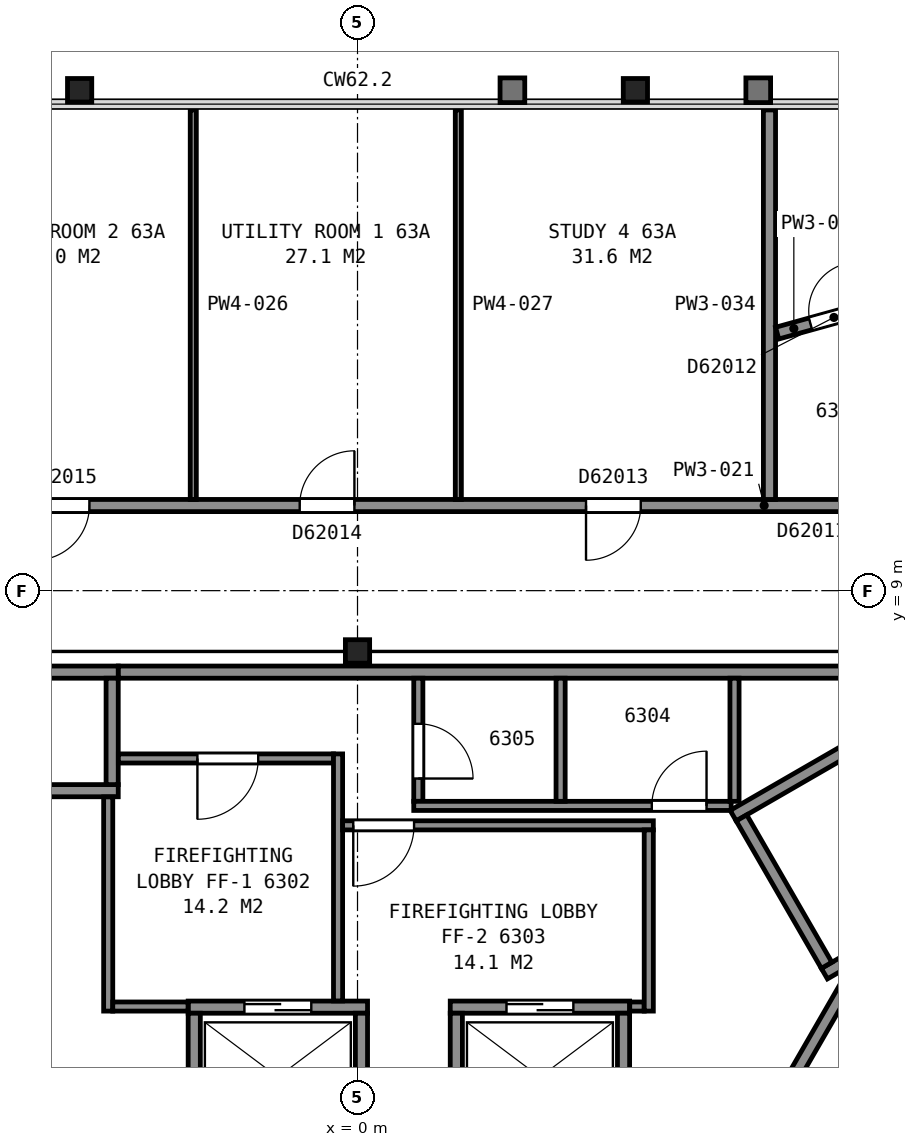
"""IFC4 building model, lengths in metres.
Left out: names, types, materials, properties, quantities, classifications, styles, units other than length and angle.
Written with IfcOpenShell. Run it as: python <this file> out.ifc"""

import sys

from ifc_helpers import new_model, si_unit, direction, frame, frame_2d, origin, origin_2d, place, context, subcontext, project, spatial, rectangle, i_section, extrude, element, fill, save


model = new_model("IFC4")
c1 = context("Model", 3, precision=1e-05, world=origin(), true_north=direction((0.0, 1.0)))
c2 = subcontext(c1, "Body", "Model", "MODEL_VIEW")
j1 = project(units=[si_unit("LENGTHUNIT", "METRE"), si_unit("PLANEANGLEUNIT", "RADIAN")], contexts=[c1])
p1 = place(None, origin())
s1 = spatial("IfcSite", under=j1, at=p1, CompositionType="ELEMENT")
p2 = place(p1, origin())
s2 = spatial("IfcBuilding", under=s1, at=p2, CompositionType="ELEMENT")
p3 = place(p2, frame((0.0, 0.0, 250.8)))
s3 = spatial("IfcBuildingStorey", under=s2, at=p3, CompositionType="ELEMENT", Elevation=250.8)
for number, where, z_axis, x_axis in (
    (1, (4.57, 17.23, 0.0), (0.0, 0.0, 1.0), (1.0, 0.0, 0.0)),
    (2, (-4.57, 17.23, 0.0), (0.0, 0.0, 1.0), (1.0, 0.0, 0.0)),
    (3, (0.0, 8.0, 0.0), (0.0, 0.0, 1.0), (1.0, 0.0, 0.0)),
):
    element("IfcColumn", number, at=place(p3, frame(where, z_axis=z_axis, x_axis=x_axis)), inside=s3, PredefinedType="COLUMN", context=c2, shape_type="SweptSolid", body=[
        extrude(i_section(OverallWidth=0.399, OverallDepth=0.386, WebThickness=0.021, FlangeThickness=0.033, FilletRadius=0.015, at=origin_2d()), origin(), (0.0, 0.0, 1.0), 3.7),
    ])
for number, where, z_axis, x_axis in (
    (4, (6.178, 5.299, 0.0), (0.0, 0.0, 1.0), (0.866, 0.5, 0.0)),
    (5, (7.678, 2.701, 0.0), (0.0, 0.0, 1.0), (0.866, 0.5, 0.0)),
):
    element("IfcWall", number, at=place(p3, frame(where, z_axis=z_axis, x_axis=x_axis)), inside=s3, PredefinedType="PARTITIONING", context=c2, shape_type="SweptSolid", body=[
        extrude(rectangle(XDim=9.6, YDim=0.2, at=frame_2d((4.8, 0.0))), origin(), (0.0, 0.0, 1.0), 3.45),
    ])
p4 = place(p3, frame((7.715, 2.838, 0.0), z_axis=(0.0, 0.0, 1.0), x_axis=(-0.500049511043, 0.865996816683, 0.0)))
e6 = element("IfcWall", 6, at=p4, inside=s3, PredefinedType="PARTITIONING", context=c2, shape_type="SweptSolid", body=[
    extrude(rectangle(XDim=2.8, YDim=0.2, at=frame_2d((1.4, 0.0))), origin(), (0.0, 0.0, 1.0), 3.45),
])
p5 = place(p3, frame((-2.785, 2.15, 0.0), z_axis=(0.0, 0.0, 1.0), x_axis=(1.0, 0.0, 0.0)))
e7 = element("IfcWall", 7, at=p5, inside=s3, PredefinedType="PARTITIONING", context=c2, shape_type="SweptSolid", body=[
    extrude(rectangle(XDim=2.95, YDim=0.2, at=frame_2d((1.475, 0.0))), origin(), (0.0, 0.0, 1.0), 3.7),
])
p6 = place(p5, frame((0.925, 0.0, 0.0)))
e8 = element("IfcOpeningElement", 8, at=p6, cuts=e7, PredefinedType="OPENING", context=c2, shape_type="SweptSolid", body=[
    extrude(rectangle(XDim=1.1, YDim=2.1, at=frame_2d((0.55, 1.05))), frame((0.0, 0.11, 0.0), z_axis=(0.0, -1.0, 0.0), x_axis=(1.0, 0.0, 0.0)), (0.0, 0.0, 1.0), 0.22),
])
p7 = place(p3, frame((1.525, 2.15, 0.0), z_axis=(0.0, 0.0, 1.0), x_axis=(1.0, 0.0, 0.0)))
e9 = element("IfcWall", 9, at=p7, inside=s3, PredefinedType="PARTITIONING", context=c2, shape_type="SweptSolid", body=[
    extrude(rectangle(XDim=2.95, YDim=0.2, at=frame_2d((1.475, 0.0))), origin(), (0.0, 0.0, 1.0), 3.7),
])
p8 = place(p7, frame((0.925, 0.0, 0.0)))
e10 = element("IfcOpeningElement", 10, at=p8, cuts=e9, PredefinedType="OPENING", context=c2, shape_type="SweptSolid", body=[
    extrude(rectangle(XDim=1.1, YDim=2.1, at=frame_2d((0.55, 1.05))), frame((0.0, 0.11, 0.0), z_axis=(0.0, -1.0, 0.0), x_axis=(1.0, 0.0, 0.0)), (0.0, 0.0, 1.0), 0.22),
])
for number, where, z_axis, x_axis in (
    (11, (-6.285, 5.71, 0.0), (0.0, 0.0, 1.0), (1.0, 0.0, 0.0)),
    (12, (-6.285, 7.66, 0.0), (0.0, 0.0, 1.0), (1.0, 0.0, 0.0)),
):
    element("IfcWall", number, at=place(p3, frame(where, z_axis=z_axis, x_axis=x_axis)), inside=s3, PredefinedType="PARTITIONING", context=c2, shape_type="SweptSolid", body=[
        extrude(rectangle(XDim=2.35, YDim=0.2, at=frame_2d((1.175, 0.0))), origin(), (0.0, 0.0, 1.0), 3.7),
    ])
p9 = place(p3, frame((7.351, -2.587, 0.0), z_axis=(0.0, 0.0, 1.0), x_axis=(0.500002801628, 0.866023786258, 0.0)))
e13 = element("IfcWall", 13, at=p9, inside=s3, PredefinedType="PARTITIONING", context=c2, shape_type="SweptSolid", body=[
    extrude(rectangle(XDim=4.9, YDim=0.2, at=frame_2d((2.45, 0.0))), origin(), (0.0, 0.0, 1.0), 3.7),
])
p10 = place(p3, frame((5.663, -1.612, 0.0), z_axis=(0.0, 0.0, 1.0), x_axis=(0.49998122708, 0.866036242063, 0.0)))
e14 = element("IfcWall", 14, at=p10, inside=s3, PredefinedType="PARTITIONING", context=c2, shape_type="SweptSolid", body=[
    extrude(rectangle(XDim=4.9, YDim=0.2, at=frame_2d((2.45, 0.0))), origin(), (0.0, 0.0, 1.0), 3.7),
])
for number, where, z_axis, x_axis in (
    (15, (4.375, 0.1, 0.0), (0.0, 0.0, 1.0), (0.0, 1.0, 0.0)),
    (16, (1.625, 0.1, 0.0), (0.0, 0.0, 1.0), (0.0, 1.0, 0.0)),
    (17, (0.065, 0.1, 0.0), (0.0, 0.0, 1.0), (0.0, 1.0, 0.0)),
    (18, (-2.685, 0.1, 0.0), (0.0, 0.0, 1.0), (0.0, 1.0, 0.0)),
):
    element("IfcWall", number, at=place(p3, frame(where, z_axis=z_axis, x_axis=x_axis)), inside=s3, PredefinedType="PARTITIONING", context=c2, shape_type="SweptSolid", body=[
        extrude(rectangle(XDim=1.95, YDim=0.2, at=frame_2d((0.975, 0.0))), origin(), (0.0, 0.0, 1.0), 3.7),
    ])
p11 = place(p3, frame((-4.035, 5.81, 0.0), z_axis=(0.0, 0.0, 1.0), x_axis=(0.0, 1.0, 0.0)))
e19 = element("IfcWall", 19, at=p11, inside=s3, PredefinedType="PARTITIONING", context=c2, shape_type="SweptSolid", body=[
    extrude(rectangle(XDim=1.75, YDim=0.2, at=frame_2d((0.875, 0.0))), origin(), (0.0, 0.0, 1.0), 3.7),
])
p12 = place(p3, frame((-4.1, 2.085, 0.0), z_axis=(0.0, 0.0, 1.0), x_axis=(0.0, 1.0, 0.0)))
e20 = element("IfcWall", 20, at=p12, inside=s3, PredefinedType="PARTITIONING", context=c2, shape_type="SweptSolid", body=[
    extrude(rectangle(XDim=3.523, YDim=0.15, at=frame_2d((1.761, 0.0))), origin(), (0.0, 0.0, 1.0), 3.45),
])
p13 = place(p3, frame((-4.025, 2.16, 0.0), z_axis=(0.0, 0.0, 1.0), x_axis=(1.0, 0.0, 0.0)))
e21 = element("IfcWall", 21, at=p13, inside=s3, PredefinedType="PARTITIONING", context=c2, shape_type="SweptSolid", body=[
    extrude(rectangle(XDim=1.238, YDim=0.15, at=frame_2d((0.619, 0.0))), origin(), (0.0, 0.0, 1.0), 3.45),
])
p14 = place(p3, frame((-3.933, 6.24, 0.0), z_axis=(0.0, 0.0, 1.0), x_axis=(1.0, 0.0, 0.0)))
e22 = element("IfcWall", 22, at=p14, inside=s3, PredefinedType="PARTITIONING", context=c2, shape_type="SweptSolid", body=[
    extrude(rectangle(XDim=3.538, YDim=0.15, at=frame_2d((1.769, 0.0))), origin(), (0.0, 0.0, 1.0), 3.45),
])
p15 = place(p14, frame((1.3, 0.0, 0.0)))
e23 = element("IfcOpeningElement", 23, at=p15, cuts=e22, PredefinedType="OPENING", context=c2, shape_type="SweptSolid", body=[
    extrude(rectangle(XDim=1.0, YDim=2.1, at=frame_2d((0.5, 1.05))), frame((0.0, 0.085, 0.0), z_axis=(0.0, -1.0, 0.0), x_axis=(1.0, 0.0, 0.0)), (0.0, 0.0, 1.0), 0.17),
])
p16 = place(p3, frame((-3.933, 7.66, 0.0), z_axis=(0.0, 0.0, 1.0), x_axis=(1.0, 0.0, 0.0)))
e24 = element("IfcWall", 24, at=p16, inside=s3, PredefinedType="PARTITIONING", context=c2, shape_type="SweptSolid", body=[
    extrude(rectangle(XDim=13.841, YDim=0.2, at=frame_2d((6.92, 0.0))), origin(), (0.0, 0.0, 1.0), 3.45),
])
p17 = place(p3, frame((-0.32, 2.252, 0.0), z_axis=(0.0, 0.0, 1.0), x_axis=(0.0, 1.0, 0.0)))
e25 = element("IfcWall", 25, at=p17, inside=s3, PredefinedType="PARTITIONING", context=c2, shape_type="SweptSolid", body=[
    extrude(rectangle(XDim=4.063, YDim=0.15, at=frame_2d((2.031, 0.0))), origin(), (0.0, 0.0, 1.0), 3.45),
])
p18 = place(p3, frame((-0.245, 5.14, 0.0), z_axis=(0.0, 0.0, 1.0), x_axis=(1.0, 0.0, 0.0)))
e26 = element("IfcWall", 26, at=p18, inside=s3, PredefinedType="PARTITIONING", context=c2, shape_type="SweptSolid", body=[
    extrude(rectangle(XDim=5.11, YDim=0.15, at=frame_2d((2.555, 0.0))), origin(), (0.0, 0.0, 1.0), 3.45),
])
p19 = place(p18, frame((0.175, 0.0, 0.0)))
e27 = element("IfcOpeningElement", 27, at=p19, cuts=e26, PredefinedType="OPENING", context=c2, shape_type="SweptSolid", body=[
    extrude(rectangle(XDim=1.0, YDim=2.1, at=frame_2d((0.5, 1.05))), frame((0.0, 0.085, 0.0), z_axis=(0.0, -1.0, 0.0), x_axis=(1.0, 0.0, 0.0)), (0.0, 0.0, 1.0), 0.17),
])
p20 = place(p3, frame((1.0, 7.56, 0.0), z_axis=(0.0, 0.0, 1.0), x_axis=(0.0, -1.0, 0.0)))
e28 = element("IfcWall", 28, at=p20, inside=s3, PredefinedType="PARTITIONING", context=c2, shape_type="SweptSolid", body=[
    extrude(rectangle(XDim=2.025, YDim=0.15, at=frame_2d((1.013, 0.0))), origin(), (0.0, 0.0, 1.0), 3.45),
])
p21 = place(p20, frame((0.75, 0.0, 0.0)))
e29 = element("IfcOpeningElement", 29, at=p21, cuts=e28, PredefinedType="OPENING", context=c2, shape_type="SweptSolid", body=[
    extrude(rectangle(XDim=0.9, YDim=2.1, at=frame_2d((0.45, 1.05))), frame((0.0, 0.085, 0.0), z_axis=(0.0, -1.0, 0.0), x_axis=(1.0, 0.0, 0.0)), (0.0, 0.0, 1.0), 0.17),
])
p22 = place(p3, frame((0.925, 5.46, 0.0), z_axis=(0.0, 0.0, 1.0), x_axis=(1.0, 0.0, 0.0)))
e30 = element("IfcWall", 30, at=p22, inside=s3, PredefinedType="PARTITIONING", context=c2, shape_type="SweptSolid", body=[
    extrude(rectangle(XDim=5.22, YDim=0.15, at=frame_2d((2.61, 0.0))), origin(), (0.0, 0.0, 1.0), 3.45),
])
p23 = place(p22, frame((3.915, 0.0, 0.0)))
e31 = element("IfcOpeningElement", 31, at=p23, cuts=e30, PredefinedType="OPENING", context=c2, shape_type="SweptSolid", body=[
    extrude(rectangle(XDim=0.9, YDim=2.1, at=frame_2d((0.45, 1.05))), frame((0.0, 0.085, 0.0), z_axis=(0.0, -1.0, 0.0), x_axis=(1.0, 0.0, 0.0)), (0.0, 0.0, 1.0), 0.17),
])
p24 = place(p3, frame((3.34, 5.535, 0.0), z_axis=(0.0, 0.0, 1.0), x_axis=(0.0, 1.0, 0.0)))
e32 = element("IfcWall", 32, at=p24, inside=s3, PredefinedType="PARTITIONING", context=c2, shape_type="SweptSolid", body=[
    extrude(rectangle(XDim=2.025, YDim=0.15, at=frame_2d((1.013, 0.0))), origin(), (0.0, 0.0, 1.0), 3.45),
])
p25 = place(p3, frame((4.477, 2.16, 0.0), z_axis=(0.0, 0.0, 1.0), x_axis=(1.0, 0.0, 0.0)))
e33 = element("IfcWall", 33, at=p25, inside=s3, PredefinedType="PARTITIONING", context=c2, shape_type="SweptSolid", body=[
    extrude(rectangle(XDim=0.238, YDim=0.15, at=frame_2d((0.119, 0.0))), origin(), (0.0, 0.0, 1.0), 3.45),
])
p26 = place(p3, frame((4.79, 2.085, 0.0), z_axis=(0.0, 0.0, 1.0), x_axis=(0.0, 1.0, 0.0)))
e34 = element("IfcWall", 34, at=p26, inside=s3, PredefinedType="PARTITIONING", context=c2, shape_type="SweptSolid", body=[
    extrude(rectangle(XDim=2.98, YDim=0.15, at=frame_2d((1.49, 0.0))), origin(), (0.0, 0.0, 1.0), 3.45),
])
p27 = place(p3, frame((6.2, 5.535, 0.0), z_axis=(0.0, 0.0, 1.0), x_axis=(0.0, 1.0, 0.0)))
e35 = element("IfcWall", 35, at=p27, inside=s3, PredefinedType="PARTITIONING", context=c2, shape_type="SweptSolid", body=[
    extrude(rectangle(XDim=2.025, YDim=0.15, at=frame_2d((1.013, 0.0))), origin(), (0.0, 0.0, 1.0), 3.45),
])
p28 = place(p3, frame((-4.675, -12.706, 0.0), z_axis=(0.0, 0.0, 1.0), x_axis=(-0.499972470324, 0.866041297467, 0.0)))
e36 = element("IfcWall", 36, at=p28, inside=s3, PredefinedType="PARTITIONING", context=c2, shape_type="SweptSolid", body=[
    extrude(rectangle(XDim=17.385, YDim=0.2, at=frame_2d((8.692, 0.0))), origin(), (0.0, 0.0, 1.0), 2.713),
])
p29 = place(p28, frame((14.57, 0.0, 0.0)))
e37 = element("IfcOpeningElement", 37, at=p29, cuts=e36, PredefinedType="OPENING", context=c2, shape_type="SweptSolid", body=[
    extrude(rectangle(XDim=0.9, YDim=2.1, at=frame_2d((0.45, 1.05))), frame((0.0, 0.11, 0.0), z_axis=(0.0, -1.0, 0.0), x_axis=(1.0, 0.0, 0.0)), (0.0, 0.0, 1.0), 0.22),
])
p30 = place(p28, frame((11.777, 0.0, 0.0)))
e38 = element("IfcOpeningElement", 38, at=p30, cuts=e36, PredefinedType="OPENING", context=c2, shape_type="SweptSolid", body=[
    extrude(rectangle(XDim=0.9, YDim=2.1, at=frame_2d((0.45, 1.05))), frame((0.0, 0.11, 0.0), z_axis=(0.0, -1.0, 0.0), x_axis=(1.0, 0.0, 0.0)), (0.0, 0.0, 1.0), 0.22),
])
p31 = place(p28, frame((5.095, 0.0, 0.0)))
e39 = element("IfcOpeningElement", 39, at=p31, cuts=e36, PredefinedType="OPENING", context=c2, shape_type="SweptSolid", body=[
    extrude(rectangle(XDim=0.9, YDim=2.1, at=frame_2d((0.45, 1.05))), frame((0.0, 0.11, 0.0), z_axis=(0.0, -1.0, 0.0), x_axis=(1.0, 0.0, 0.0)), (0.0, 0.0, 1.0), 0.22),
])
p32 = place(p3, frame((-8.667, 10.4, 0.0), z_axis=(0.0, 0.0, 1.0), x_axis=(1.0, 0.0, 0.0)))
e40 = element("IfcWall", 40, at=p32, inside=s3, PredefinedType="PARTITIONING", context=c2, shape_type="SweptSolid", body=[
    extrude(rectangle(XDim=17.384, YDim=0.2, at=frame_2d((8.692, 0.0))), origin(), (0.0, 0.0, 1.0), 2.713),
])
p33 = place(p32, frame((12.425, 0.0, 0.0)))
e41 = element("IfcOpeningElement", 41, at=p33, cuts=e40, PredefinedType="OPENING", context=c2, shape_type="SweptSolid", body=[
    extrude(rectangle(XDim=0.9, YDim=2.1, at=frame_2d((0.45, 1.05))), frame((0.0, 0.11, 0.0), z_axis=(0.0, -1.0, 0.0), x_axis=(1.0, 0.0, 0.0)), (0.0, 0.0, 1.0), 0.22),
])
p34 = place(p32, frame((7.716, 0.0, 0.0)))
e42 = element("IfcOpeningElement", 42, at=p34, cuts=e40, PredefinedType="OPENING", context=c2, shape_type="SweptSolid", body=[
    extrude(rectangle(XDim=0.9, YDim=2.1, at=frame_2d((0.45, 1.05))), frame((0.0, 0.11, 0.0), z_axis=(0.0, -1.0, 0.0), x_axis=(1.0, 0.0, 0.0)), (0.0, 0.0, 1.0), 0.22),
])
p35 = place(p32, frame((3.358, 0.0, 0.0)))
e43 = element("IfcOpeningElement", 43, at=p35, cuts=e40, PredefinedType="OPENING", context=c2, shape_type="SweptSolid", body=[
    extrude(rectangle(XDim=0.9, YDim=2.1, at=frame_2d((0.45, 1.05))), frame((0.0, 0.11, 0.0), z_axis=(0.0, -1.0, 0.0), x_axis=(1.0, 0.0, 0.0)), (0.0, 0.0, 1.0), 0.22),
])
for number, where, z_axis, x_axis in (
    (44, (-2.701, 10.5, 0.0), (0.0, 0.0, 1.0), (0.0, 1.0, 0.0)),
    (45, (1.658, 10.5, 0.0), (0.0, 0.0, 1.0), (0.0, 1.0, 0.0)),
):
    element("IfcWall", number, at=place(p3, frame(where, z_axis=z_axis, x_axis=x_axis)), inside=s3, PredefinedType="PARTITIONING", context=c2, shape_type="SweptSolid", body=[
        extrude(rectangle(XDim=6.406, YDim=0.1, at=frame_2d((3.203, 0.0))), origin(), (0.0, 0.0, 1.0), 2.713),
    ])
p36 = place(p3, frame((13.342, 2.306, 0.0), z_axis=(0.0, 0.0, 1.0), x_axis=(-0.499983003136, -0.866035216706, 0.0)))
e46 = element("IfcWall", 46, at=p36, inside=s3, PredefinedType="PARTITIONING", context=c2, shape_type="SweptSolid", body=[
    extrude(rectangle(XDim=17.385, YDim=0.2, at=frame_2d((8.692, 0.0))), origin(), (0.0, 0.0, 1.0), 2.713),
])
p37 = place(p36, frame((15.185, 0.0, 0.0)))
e47 = element("IfcOpeningElement", 47, at=p37, cuts=e46, PredefinedType="OPENING", context=c2, shape_type="SweptSolid", body=[
    extrude(rectangle(XDim=0.9, YDim=2.1, at=frame_2d((0.45, 1.05))), frame((0.0, 0.11, 0.0), z_axis=(0.0, -1.0, 0.0), x_axis=(1.0, 0.0, 0.0)), (0.0, 0.0, 1.0), 0.22),
])
p38 = place(p36, frame((12.094, 0.0, 0.0)))
e48 = element("IfcOpeningElement", 48, at=p38, cuts=e46, PredefinedType="OPENING", context=c2, shape_type="SweptSolid", body=[
    extrude(rectangle(XDim=0.9, YDim=2.1, at=frame_2d((0.45, 1.05))), frame((0.0, 0.11, 0.0), z_axis=(0.0, -1.0, 0.0), x_axis=(1.0, 0.0, 0.0)), (0.0, 0.0, 1.0), 0.22),
])
p39 = place(p36, frame((5.867, 0.0, 0.0)))
e49 = element("IfcOpeningElement", 49, at=p39, cuts=e46, PredefinedType="OPENING", context=c2, shape_type="SweptSolid", body=[
    extrude(rectangle(XDim=0.9, YDim=2.1, at=frame_2d((0.45, 1.05))), frame((0.0, 0.11, 0.0), z_axis=(0.0, -1.0, 0.0), x_axis=(1.0, 0.0, 0.0)), (0.0, 0.0, 1.0), 0.22),
])
p40 = place(p36, frame((1.392, 0.0, 0.0)))
e50 = element("IfcOpeningElement", 50, at=p40, cuts=e46, PredefinedType="OPENING", context=c2, shape_type="SweptSolid", body=[
    extrude(rectangle(XDim=0.9, YDim=2.1, at=frame_2d((0.45, 1.05))), frame((0.0, 0.11, 0.0), z_axis=(0.0, -1.0, 0.0), x_axis=(1.0, 0.0, 0.0)), (0.0, 0.0, 1.0), 0.22),
])
p41 = place(p3, frame((6.775, 10.5, 0.0), z_axis=(0.0, 0.0, 1.0), x_axis=(0.0, 1.0, 0.0)))
e51 = element("IfcWall", 51, at=p41, inside=s3, PredefinedType="PARTITIONING", context=c2, shape_type="SweptSolid", body=[
    extrude(rectangle(XDim=6.406, YDim=0.2, at=frame_2d((3.203, 0.0))), origin(), (0.0, 0.0, 1.0), 2.713),
])
p42 = place(p3, frame((8.75, 13.747, 0.0), z_axis=(0.0, 0.0, 1.0), x_axis=(-0.963674591663, -0.267079166884, 0.0)))
e52 = element("IfcWall", 52, at=p42, inside=s3, PredefinedType="PARTITIONING", context=c2, shape_type="SweptSolid", body=[
    extrude(rectangle(XDim=1.918, YDim=0.2, at=frame_2d((0.959, 0.0))), origin(), (0.0, 0.0, 1.0), 2.713),
])
p43 = place(p42, frame((0.549, 0.0, 0.0)))
e53 = element("IfcOpeningElement", 53, at=p43, cuts=e52, PredefinedType="OPENING", context=c2, shape_type="SweptSolid", body=[
    extrude(rectangle(XDim=0.8, YDim=2.1, at=frame_2d((0.4, 1.05))), frame((0.0, 0.11, 0.0), z_axis=(0.0, -1.0, 0.0), x_axis=(1.0, 0.0, 0.0)), (0.0, 0.0, 1.0), 0.22),
])
p44 = place(p6, origin())
e54 = element("IfcDoor", 54, at=p44, inside=s3, OperationType="SLIDING_TO_LEFT", PredefinedType="DOOR", context=c2, shape_type="SweptSolid", body=[
    extrude(rectangle(XDim=1.1, YDim=2.1, at=frame_2d((0.55, 1.05))), frame((0.0, 0.025, 0.0), z_axis=(0.0, -1.0, 0.0), x_axis=(1.0, 0.0, 0.0)), (0.0, 0.0, 1.0), 0.05),
])
fill(e8, e54)
p45 = place(p8, origin())
e55 = element("IfcDoor", 55, at=p45, inside=s3, OperationType="SLIDING_TO_RIGHT", PredefinedType="DOOR", context=c2, shape_type="SweptSolid", body=[
    extrude(rectangle(XDim=1.1, YDim=2.1, at=frame_2d((0.55, 1.05))), frame((0.0, 0.025, 0.0), z_axis=(0.0, -1.0, 0.0), x_axis=(1.0, 0.0, 0.0)), (0.0, 0.0, 1.0), 0.05),
])
fill(e10, e55)
p46 = place(p15, origin())
e56 = element("IfcDoor", 56, at=p46, inside=s3, OperationType="SINGLE_SWING_LEFT", PredefinedType="DOOR", context=c2, shape_type="SweptSolid", body=[
    extrude(rectangle(XDim=1.0, YDim=2.1, at=frame_2d((0.5, 1.05))), frame((0.0, 0.025, 0.0), z_axis=(0.0, -1.0, 0.0), x_axis=(1.0, 0.0, 0.0)), (0.0, 0.0, 1.0), 0.05),
])
fill(e23, e56)
p47 = place(p19, origin())
e57 = element("IfcDoor", 57, at=p47, inside=s3, OperationType="SINGLE_SWING_LEFT", PredefinedType="DOOR", context=c2, shape_type="SweptSolid", body=[
    extrude(rectangle(XDim=1.0, YDim=2.1, at=frame_2d((0.5, 1.05))), frame((0.0, 0.025, 0.0), z_axis=(0.0, -1.0, 0.0), x_axis=(1.0, 0.0, 0.0)), (0.0, 0.0, 1.0), 0.05),
])
fill(e27, e57)
p48 = place(p21, origin())
e58 = element("IfcDoor", 58, at=p48, inside=s3, OperationType="SINGLE_SWING_RIGHT", PredefinedType="DOOR", context=c2, shape_type="SweptSolid", body=[
    extrude(rectangle(XDim=0.9, YDim=2.1, at=frame_2d((0.45, 1.05))), frame((0.0, 0.025, 0.0), z_axis=(0.0, -1.0, 0.0), x_axis=(1.0, 0.0, 0.0)), (0.0, 0.0, 1.0), 0.05),
])
fill(e29, e58)
p49 = place(p23, origin())
e59 = element("IfcDoor", 59, at=p49, inside=s3, OperationType="SINGLE_SWING_RIGHT", PredefinedType="DOOR", context=c2, shape_type="SweptSolid", body=[
    extrude(rectangle(XDim=0.9, YDim=2.1, at=frame_2d((0.45, 1.05))), frame((0.0, 0.025, 0.0), z_axis=(0.0, -1.0, 0.0), x_axis=(1.0, 0.0, 0.0)), (0.0, 0.0, 1.0), 0.05),
])
fill(e31, e59)
p50 = place(p33, origin())
e60 = element("IfcDoor", 60, at=p50, inside=s3, OperationType="SINGLE_SWING_LEFT", PredefinedType="DOOR", context=c2, shape_type="SweptSolid", body=[
    extrude(rectangle(XDim=0.9, YDim=2.1, at=frame_2d((0.45, 1.05))), frame((0.0, 0.025, 0.0), z_axis=(0.0, -1.0, 0.0), x_axis=(1.0, 0.0, 0.0)), (0.0, 0.0, 1.0), 0.05),
])
fill(e41, e60)
p51 = place(p34, origin())
e61 = element("IfcDoor", 61, at=p51, inside=s3, OperationType="SINGLE_SWING_RIGHT", PredefinedType="DOOR", context=c2, shape_type="SweptSolid", body=[
    extrude(rectangle(XDim=0.9, YDim=2.1, at=frame_2d((0.45, 1.05))), frame((0.0, 0.025, 0.0), z_axis=(0.0, -1.0, 0.0), x_axis=(1.0, 0.0, 0.0)), (0.0, 0.0, 1.0), 0.05),
])
fill(e42, e61)
p52 = place(p35, origin())
e62 = element("IfcDoor", 62, at=p52, inside=s3, OperationType="SINGLE_SWING_LEFT", PredefinedType="DOOR", context=c2, shape_type="SweptSolid", body=[
    extrude(rectangle(XDim=0.9, YDim=2.1, at=frame_2d((0.45, 1.05))), frame((0.0, 0.025, 0.0), z_axis=(0.0, -1.0, 0.0), x_axis=(1.0, 0.0, 0.0)), (0.0, 0.0, 1.0), 0.05),
])
fill(e43, e62)
p53 = place(p43, origin())
e63 = element("IfcDoor", 63, at=p53, inside=s3, OperationType="SINGLE_SWING_LEFT", PredefinedType="DOOR", context=c2, shape_type="SweptSolid", body=[
    extrude(rectangle(XDim=0.8, YDim=2.1, at=frame_2d((0.4, 1.05))), frame((0.0, 0.025, 0.0), z_axis=(0.0, -1.0, 0.0), x_axis=(1.0, 0.0, 0.0)), (0.0, 0.0, 1.0), 0.05),
])
fill(e53, e63)
save(model, sys.argv[1])
